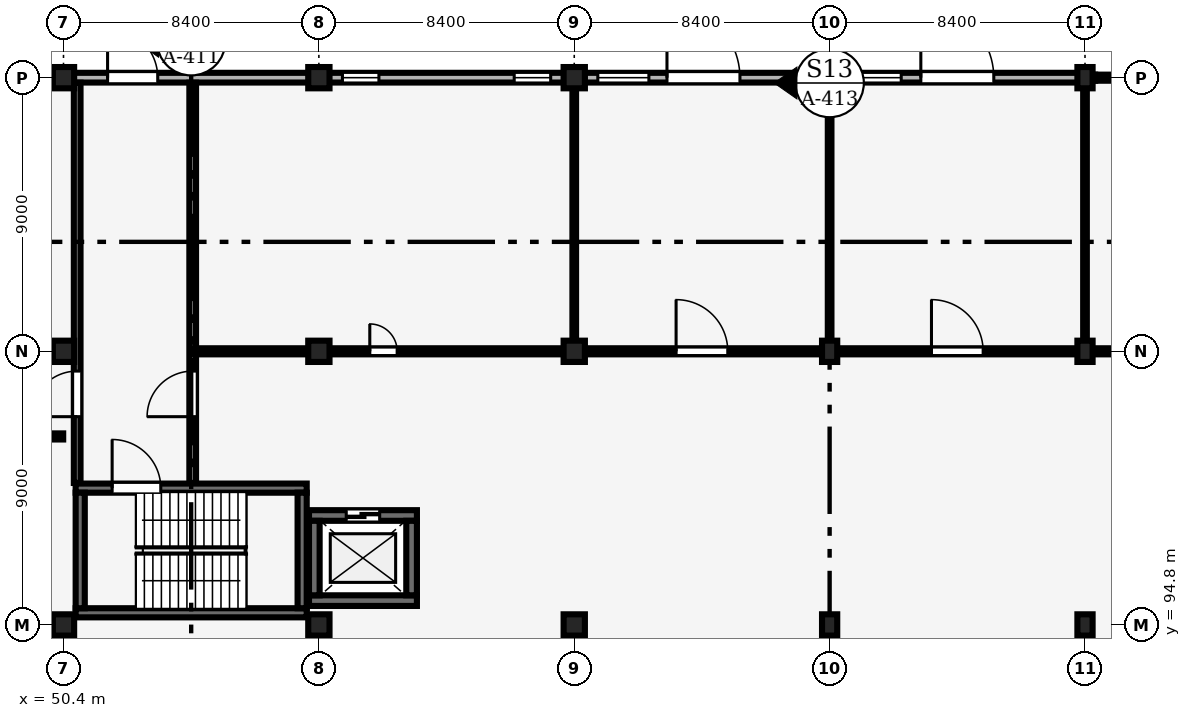
"""IFC4 building model, lengths in metres.
Left out: names, types, materials, properties, quantities, classifications, styles, units other than length and angle.
Written with IfcOpenShell. Run it as: python <this file> out.ifc"""

import sys

from ifc_helpers import new_model, si_unit, direction, frame, frame_2d, origin, origin_2d, place, context, subcontext, project, spatial, rectangle, extrude, element, fill, save


model = new_model("IFC4")
c1 = context("Model", 3, precision=1e-05, world=origin(), true_north=direction((0.0, 1.0)))
c2 = subcontext(c1, "Body", "Model", "MODEL_VIEW")
j1 = project(units=[si_unit("LENGTHUNIT", "METRE"), si_unit("PLANEANGLEUNIT", "RADIAN")], contexts=[c1])
p1 = place(None, origin())
s1 = spatial("IfcSite", under=j1, at=p1, CompositionType="ELEMENT")
p2 = place(p1, origin())
s2 = spatial("IfcBuilding", under=s1, at=p2, CompositionType="ELEMENT")
p3 = place(p2, origin())
s3 = spatial("IfcBuildingStorey", under=s2, at=p3, CompositionType="ELEMENT", Elevation=0.0)
for number, where, z_axis, x_axis in (
    (1, (50.4, 94.8, 0.0), (0.0, 0.0, 1.0), (1.0, 0.0, 0.0)),
    (2, (50.4, 103.8, 0.0), (0.0, 0.0, 1.0), (1.0, 0.0, 0.0)),
    (3, (50.4, 112.8, 0.0), (0.0, 0.0, 1.0), (1.0, 0.0, 0.0)),
    (4, (58.8, 94.8, 0.0), (0.0, 0.0, 1.0), (1.0, 0.0, 0.0)),
    (5, (58.8, 103.8, 0.0), (0.0, 0.0, 1.0), (1.0, 0.0, 0.0)),
    (6, (58.8, 112.8, 0.0), (0.0, 0.0, 1.0), (1.0, 0.0, 0.0)),
    (7, (67.2, 94.8, 0.0), (0.0, 0.0, 1.0), (1.0, 0.0, 0.0)),
    (8, (67.2, 103.8, 0.0), (0.0, 0.0, 1.0), (1.0, 0.0, 0.0)),
    (9, (67.2, 112.8, 0.0), (0.0, 0.0, 1.0), (1.0, 0.0, 0.0)),
):
    element("IfcColumn", number, at=place(p3, frame(where, z_axis=z_axis, x_axis=x_axis)), inside=s3, PredefinedType="COLUMN", context=c2, shape_type="SweptSolid", body=[
        extrude(rectangle(XDim=0.7, YDim=0.7, at=origin_2d()), origin(), (0.0, 0.0, 1.0), 4.8),
    ])
for number, where, z_axis, x_axis in (
    (10, (75.6, 94.8, 0.0), (0.0, 0.0, 1.0), (1.0, 0.0, 0.0)),
    (11, (75.6, 103.8, 0.0), (0.0, 0.0, 1.0), (1.0, 0.0, 0.0)),
    (12, (75.6, 112.8, 0.0), (0.0, 0.0, 1.0), (1.0, 0.0, 0.0)),
    (13, (84.0, 94.8, 0.0), (0.0, 0.0, 1.0), (1.0, 0.0, 0.0)),
    (14, (84.0, 103.8, 0.0), (0.0, 0.0, 1.0), (1.0, 0.0, 0.0)),
    (15, (84.0, 112.8, 0.0), (0.0, 0.0, 1.0), (1.0, 0.0, 0.0)),
):
    element("IfcColumn", number, at=place(p3, frame(where, z_axis=z_axis, x_axis=x_axis)), inside=s3, PredefinedType="COLUMN", context=c2, shape_type="SweptSolid", body=[
        extrude(rectangle(XDim=0.5, YDim=0.7, at=origin_2d()), origin(), (0.0, 0.0, 1.0), 4.8),
    ])
p4 = place(p3, frame((42.325, 112.8, 0.0), z_axis=(0.0, 0.0, 1.0), x_axis=(1.0, 0.0, 0.0)))
e16 = element("IfcWall", 16, at=p4, inside=s3, PredefinedType="SOLIDWALL", context=c2, shape_type="SweptSolid", body=[
    extrude(rectangle(XDim=7.75, YDim=0.32, at=frame_2d((3.875, 0.0))), origin(), (0.0, 0.0, 1.0), 3.92),
])
p5 = place(p4, frame((0.45, 0.0, 0.9)))
e17 = element("IfcOpeningElement", 17, at=p5, cuts=e16, PredefinedType="OPENING", context=c2, shape_type="SweptSolid", body=[
    extrude(rectangle(XDim=1.2, YDim=1.8, at=frame_2d((0.6, 0.9))), frame((0.0, 0.17, 0.0), z_axis=(0.0, -1.0, 0.0), x_axis=(1.0, 0.0, 0.0)), (0.0, 0.0, 1.0), 0.34),
])
p6 = place(p4, frame((5.82, 0.0, 0.9)))
e18 = element("IfcOpeningElement", 18, at=p6, cuts=e16, PredefinedType="OPENING", context=c2, shape_type="SweptSolid", body=[
    extrude(rectangle(XDim=1.68, YDim=2.4, at=frame_2d((0.84, 1.2))), frame((0.0, 0.17, 0.0), z_axis=(0.0, -1.0, 0.0), x_axis=(1.0, 0.0, 0.0)), (0.0, 0.0, 1.0), 0.34),
])
p7 = place(p3, frame((50.725, 112.8, 0.0), z_axis=(0.0, 0.0, 1.0), x_axis=(1.0, 0.0, 0.0)))
e19 = element("IfcWall", 19, at=p7, inside=s3, PredefinedType="SOLIDWALL", context=c2, shape_type="SweptSolid", body=[
    extrude(rectangle(XDim=7.75, YDim=0.32, at=frame_2d((3.875, 0.0))), origin(), (0.0, 0.0, 1.0), 3.87),
])
p8 = place(p7, frame((1.125, 0.0, 0.0)))
e20 = element("IfcOpeningElement", 20, at=p8, cuts=e19, PredefinedType="OPENING", context=c2, shape_type="SweptSolid", body=[
    extrude(rectangle(XDim=1.65, YDim=2.25, at=frame_2d((0.825, 1.125))), frame((0.0, 0.17, 0.0), z_axis=(0.0, -1.0, 0.0), x_axis=(1.0, 0.0, 0.0)), (0.0, 0.0, 1.0), 0.34),
])
p9 = place(p3, frame((59.125, 112.8, 0.0), z_axis=(0.0, 0.0, 1.0), x_axis=(1.0, 0.0, 0.0)))
e21 = element("IfcWall", 21, at=p9, inside=s3, PredefinedType="SOLIDWALL", context=c2, shape_type="SweptSolid", body=[
    extrude(rectangle(XDim=7.75, YDim=0.32, at=frame_2d((3.875, 0.0))), origin(), (0.0, 0.0, 1.0), 3.82),
])
p10 = place(p9, frame((0.45, 0.0, 0.9)))
e22 = element("IfcOpeningElement", 22, at=p10, cuts=e21, PredefinedType="OPENING", context=c2, shape_type="SweptSolid", body=[
    extrude(rectangle(XDim=1.2, YDim=1.5, at=frame_2d((0.6, 0.75))), frame((0.0, 0.17, 0.0), z_axis=(0.0, -1.0, 0.0), x_axis=(1.0, 0.0, 0.0)), (0.0, 0.0, 1.0), 0.34),
])
p11 = place(p9, frame((6.1, 0.0, 0.9)))
e23 = element("IfcOpeningElement", 23, at=p11, cuts=e21, PredefinedType="OPENING", context=c2, shape_type="SweptSolid", body=[
    extrude(rectangle(XDim=1.2, YDim=1.8, at=frame_2d((0.6, 0.9))), frame((0.0, 0.17, 0.0), z_axis=(0.0, -1.0, 0.0), x_axis=(1.0, 0.0, 0.0)), (0.0, 0.0, 1.0), 0.34),
])
p12 = place(p3, frame((67.525, 112.8, 0.0), z_axis=(0.0, 0.0, 1.0), x_axis=(1.0, 0.0, 0.0)))
e24 = element("IfcWall", 24, at=p12, inside=s3, PredefinedType="SOLIDWALL", context=c2, shape_type="SweptSolid", body=[
    extrude(rectangle(XDim=7.85, YDim=0.32, at=frame_2d((3.925, 0.0))), origin(), (0.0, 0.0, 1.0), 3.87),
])
p13 = place(p12, frame((2.725, 0.0, 0.0)))
e25 = element("IfcOpeningElement", 25, at=p13, cuts=e24, PredefinedType="OPENING", context=c2, shape_type="SweptSolid", body=[
    extrude(rectangle(XDim=2.4, YDim=2.6, at=frame_2d((1.2, 1.3))), frame((0.0, 0.17, 0.0), z_axis=(0.0, -1.0, 0.0), x_axis=(1.0, 0.0, 0.0)), (0.0, 0.0, 1.0), 0.34),
])
p14 = place(p12, frame((0.45, 0.0, 0.95)))
e26 = element("IfcOpeningElement", 26, at=p14, cuts=e24, PredefinedType="OPENING", context=c2, shape_type="SweptSolid", body=[
    extrude(rectangle(XDim=1.68, YDim=1.8, at=frame_2d((0.84, 0.9))), frame((0.0, 0.17, 0.0), z_axis=(0.0, -1.0, 0.0), x_axis=(1.0, 0.0, 0.0)), (0.0, 0.0, 1.0), 0.34),
])
p15 = place(p3, frame((75.825, 112.8, 0.0), z_axis=(0.0, 0.0, 1.0), x_axis=(1.0, 0.0, 0.0)))
e27 = element("IfcWall", 27, at=p15, inside=s3, PredefinedType="SOLIDWALL", context=c2, shape_type="SweptSolid", body=[
    extrude(rectangle(XDim=7.95, YDim=0.32, at=frame_2d((3.975, 0.0))), origin(), (0.0, 0.0, 1.0), 3.82),
])
p16 = place(p15, frame((2.775, 0.0, 0.0)))
e28 = element("IfcOpeningElement", 28, at=p16, cuts=e27, PredefinedType="OPENING", context=c2, shape_type="SweptSolid", body=[
    extrude(rectangle(XDim=2.4, YDim=2.6, at=frame_2d((1.2, 1.3))), frame((0.0, 0.17, 0.0), z_axis=(0.0, -1.0, 0.0), x_axis=(1.0, 0.0, 0.0)), (0.0, 0.0, 1.0), 0.34),
])
p17 = place(p15, frame((0.45, 0.0, 0.95)))
e29 = element("IfcOpeningElement", 29, at=p17, cuts=e27, PredefinedType="OPENING", context=c2, shape_type="SweptSolid", body=[
    extrude(rectangle(XDim=1.68, YDim=1.8, at=frame_2d((0.84, 0.9))), frame((0.0, 0.17, 0.0), z_axis=(0.0, -1.0, 0.0), x_axis=(1.0, 0.0, 0.0)), (0.0, 0.0, 1.0), 0.34),
])
p18 = place(p3, frame((50.8, 95.2, 0.0), z_axis=(0.0, 0.0, 1.0), x_axis=(1.0, 0.0, 0.0)))
e30 = element("IfcWall", 30, at=p18, inside=s3, PredefinedType="SHEAR", context=c2, shape_type="SweptSolid", body=[
    extrude(rectangle(XDim=7.6, YDim=0.3, at=frame_2d((3.8, 0.0))), origin(), (0.0, 0.0, 1.0), 4.625),
])
p19 = place(p3, frame((50.8, 99.3, 0.0), z_axis=(0.0, 0.0, 1.0), x_axis=(1.0, 0.0, 0.0)))
e31 = element("IfcWall", 31, at=p19, inside=s3, PredefinedType="SHEAR", context=c2, shape_type="SweptSolid", body=[
    extrude(rectangle(XDim=7.6, YDim=0.3, at=frame_2d((3.8, 0.0))), origin(), (0.0, 0.0, 1.0), 4.625),
])
p20 = place(p19, frame((1.2, 0.0, 0.0)))
e32 = element("IfcOpeningElement", 32, at=p20, cuts=e31, PredefinedType="OPENING", context=c2, shape_type="SweptSolid", body=[
    extrude(rectangle(XDim=1.6, YDim=2.2, at=frame_2d((0.8, 1.1))), frame((0.0, 0.16, 0.0), z_axis=(0.0, -1.0, 0.0), x_axis=(1.0, 0.0, 0.0)), (0.0, 0.0, 1.0), 0.32),
])
for number, where, z_axis, x_axis in (
    (33, (50.95, 95.35, 0.0), (0.0, 0.0, 1.0), (0.0, 1.0, 0.0)),
    (34, (58.25, 95.35, 0.0), (0.0, 0.0, 1.0), (0.0, 1.0, 0.0)),
):
    element("IfcWall", number, at=place(p3, frame(where, z_axis=z_axis, x_axis=x_axis)), inside=s3, PredefinedType="SHEAR", context=c2, shape_type="SweptSolid", body=[
        extrude(rectangle(XDim=3.8, YDim=0.3, at=frame_2d((1.9, 0.0))), origin(), (0.0, 0.0, 1.0), 4.625),
    ])
p21 = place(p3, frame((58.475, 95.6, 0.0), z_axis=(0.0, 0.0, 1.0), x_axis=(1.0, 0.0, 0.0)))
e35 = element("IfcWall", 35, at=p21, inside=s3, PredefinedType="SHEAR", context=c2, shape_type="SweptSolid", body=[
    extrude(rectangle(XDim=3.55, YDim=0.35, at=frame_2d((1.775, 0.0))), origin(), (0.0, 0.0, 1.0), 4.52),
])
p22 = place(p3, frame((58.475, 98.4, 0.0), z_axis=(0.0, 0.0, 1.0), x_axis=(1.0, 0.0, 0.0)))
e36 = element("IfcWall", 36, at=p22, inside=s3, PredefinedType="SHEAR", context=c2, shape_type="SweptSolid", body=[
    extrude(rectangle(XDim=3.55, YDim=0.35, at=frame_2d((1.775, 0.0))), origin(), (0.0, 0.0, 1.0), 4.52),
])
p23 = place(p22, frame((1.225, 0.0, 0.0)))
e37 = element("IfcOpeningElement", 37, at=p23, cuts=e36, PredefinedType="OPENING", context=c2, shape_type="SweptSolid", body=[
    extrude(rectangle(XDim=1.1, YDim=2.2, at=frame_2d((0.55, 1.1))), frame((0.0, 0.185, 0.0), z_axis=(0.0, -1.0, 0.0), x_axis=(1.0, 0.0, 0.0)), (0.0, 0.0, 1.0), 0.37),
])
for number, where, z_axis, x_axis in (
    (38, (58.65, 95.775, 0.0), (0.0, 0.0, 1.0), (0.0, 1.0, 0.0)),
    (39, (61.85, 95.775, 0.0), (0.0, 0.0, 1.0), (0.0, 1.0, 0.0)),
):
    element("IfcWall", number, at=place(p3, frame(where, z_axis=z_axis, x_axis=x_axis)), inside=s3, PredefinedType="SHEAR", context=c2, shape_type="SweptSolid", body=[
        extrude(rectangle(XDim=2.45, YDim=0.35, at=frame_2d((1.225, 0.0))), origin(), (0.0, 0.0, 1.0), 4.52),
    ])
p24 = place(p3, frame((50.85, 99.47, 0.0), z_axis=(0.0, 0.0, 1.0), x_axis=(0.0, 1.0, 0.0)))
e40 = element("IfcWall", 40, at=p24, inside=s3, PredefinedType="SOLIDWALL", context=c2, shape_type="SweptSolid", body=[
    extrude(rectangle(XDim=13.165, YDim=0.22, at=frame_2d((6.583, 0.0))), origin(), (0.0, 0.0, 1.0), 4.5),
])
p25 = place(p24, frame((2.18, 0.0, 0.0)))
e41 = element("IfcOpeningElement", 41, at=p25, cuts=e40, PredefinedType="OPENING", context=c2, shape_type="SweptSolid", body=[
    extrude(rectangle(XDim=1.5, YDim=2.2, at=frame_2d((0.75, 1.1))), frame((0.0, 0.12, 0.0), z_axis=(0.0, -1.0, 0.0), x_axis=(1.0, 0.0, 0.0)), (0.0, 0.0, 1.0), 0.24),
])
p26 = place(p3, frame((54.65, 99.47, 0.0), z_axis=(0.0, 0.0, 1.0), x_axis=(0.0, 1.0, 0.0)))
e42 = element("IfcWall", 42, at=p26, inside=s3, PredefinedType="SOLIDWALL", context=c2, shape_type="SweptSolid", body=[
    extrude(rectangle(XDim=13.165, YDim=0.22, at=frame_2d((6.583, 0.0))), origin(), (0.0, 0.0, 1.0), 4.5),
])
p27 = place(p26, frame((2.18, 0.0, 0.0)))
e43 = element("IfcOpeningElement", 43, at=p27, cuts=e42, PredefinedType="OPENING", context=c2, shape_type="SweptSolid", body=[
    extrude(rectangle(XDim=1.5, YDim=2.2, at=frame_2d((0.75, 1.1))), frame((0.0, 0.12, 0.0), z_axis=(0.0, -1.0, 0.0), x_axis=(1.0, 0.0, 0.0)), (0.0, 0.0, 1.0), 0.24),
])
p28 = place(p3, frame((42.195, 103.8, 0.0), z_axis=(0.0, 0.0, 1.0), x_axis=(1.0, 0.0, 0.0)))
e44 = element("IfcWall", 44, at=p28, inside=s3, PredefinedType="SHEAR", context=c2, shape_type="SweptSolid", body=[
    extrude(rectangle(XDim=7.845, YDim=0.3, at=frame_2d((3.922, 0.0))), origin(), (0.0, 0.0, 1.0), 3.67),
])
p29 = place(p28, frame((3.585, 0.0, 0.0)))
e45 = element("IfcOpeningElement", 45, at=p29, cuts=e44, PredefinedType="OPENING", context=c2, shape_type="SweptSolid", body=[
    extrude(rectangle(XDim=1.05, YDim=2.1, at=frame_2d((0.525, 1.05))), frame((0.0, 0.16, 0.0), z_axis=(0.0, -1.0, 0.0), x_axis=(1.0, 0.0, 0.0)), (0.0, 0.0, 1.0), 0.32),
])
p30 = place(p3, frame((67.2, 103.905, 0.0), z_axis=(0.0, 0.0, 1.0), x_axis=(0.0, 1.0, 0.0)))
e46 = element("IfcWall", 46, at=p30, inside=s3, PredefinedType="PARTITIONING", context=c2, shape_type="SweptSolid", body=[
    extrude(rectangle(XDim=8.73, YDim=0.12, at=frame_2d((4.365, 0.0))), origin(), (0.0, 0.0, 1.0), 3.52),
])
p31 = place(p3, frame((75.6, 103.905, 0.0), z_axis=(0.0, 0.0, 1.0), x_axis=(0.0, 1.0, 0.0)))
e47 = element("IfcWall", 47, at=p31, inside=s3, PredefinedType="PARTITIONING", context=c2, shape_type="SweptSolid", body=[
    extrude(rectangle(XDim=8.73, YDim=0.12, at=frame_2d((4.365, 0.0))), origin(), (0.0, 0.0, 1.0), 3.87),
])
p32 = place(p3, frame((84.0, 103.905, 0.0), z_axis=(0.0, 0.0, 1.0), x_axis=(0.0, 1.0, 0.0)))
e48 = element("IfcWall", 48, at=p32, inside=s3, PredefinedType="PARTITIONING", context=c2, shape_type="SweptSolid", body=[
    extrude(rectangle(XDim=8.73, YDim=0.12, at=frame_2d((4.365, 0.0))), origin(), (0.0, 0.0, 1.0), 3.72),
])
p33 = place(p3, frame((54.66, 103.8, 0.0), z_axis=(0.0, 0.0, 1.0), x_axis=(1.0, 0.0, 0.0)))
e49 = element("IfcWall", 49, at=p33, inside=s3, PredefinedType="PARTITIONING", context=c2, shape_type="SweptSolid", body=[
    extrude(rectangle(XDim=3.78, YDim=0.2, at=frame_2d((1.89, 0.0))), origin(), (0.0, 0.0, 1.0), 3.67),
])
p34 = place(p3, frame((59.16, 103.8, 0.0), z_axis=(0.0, 0.0, 1.0), x_axis=(1.0, 0.0, 0.0)))
e50 = element("IfcWall", 50, at=p34, inside=s3, PredefinedType="PARTITIONING", context=c2, shape_type="SweptSolid", body=[
    extrude(rectangle(XDim=7.68, YDim=0.2, at=frame_2d((3.84, 0.0))), origin(), (0.0, 0.0, 1.0), 3.62),
])
p35 = place(p34, frame((1.315, 0.0, 0.0)))
e51 = element("IfcOpeningElement", 51, at=p35, cuts=e50, PredefinedType="OPENING", context=c2, shape_type="SweptSolid", body=[
    extrude(rectangle(XDim=0.9, YDim=2.1, at=frame_2d((0.45, 1.05))), frame((0.0, 0.11, 0.0), z_axis=(0.0, -1.0, 0.0), x_axis=(1.0, 0.0, 0.0)), (0.0, 0.0, 1.0), 0.22),
])
p36 = place(p3, frame((67.56, 103.8, 0.0), z_axis=(0.0, 0.0, 1.0), x_axis=(1.0, 0.0, 0.0)))
e52 = element("IfcWall", 52, at=p36, inside=s3, PredefinedType="PARTITIONING", context=c2, shape_type="SweptSolid", body=[
    extrude(rectangle(XDim=7.78, YDim=0.2, at=frame_2d((3.89, 0.0))), origin(), (0.0, 0.0, 1.0), 3.57),
])
p37 = place(p36, frame((2.99, 0.0, 0.0)))
e53 = element("IfcOpeningElement", 53, at=p37, cuts=e52, PredefinedType="OPENING", context=c2, shape_type="SweptSolid", body=[
    extrude(rectangle(XDim=1.7, YDim=2.25, at=frame_2d((0.85, 1.125))), frame((0.0, 0.11, 0.0), z_axis=(0.0, -1.0, 0.0), x_axis=(1.0, 0.0, 0.0)), (0.0, 0.0, 1.0), 0.22),
])
p38 = place(p3, frame((75.86, 103.8, 0.0), z_axis=(0.0, 0.0, 1.0), x_axis=(1.0, 0.0, 0.0)))
e54 = element("IfcWall", 54, at=p38, inside=s3, PredefinedType="PARTITIONING", context=c2, shape_type="SweptSolid", body=[
    extrude(rectangle(XDim=7.88, YDim=0.2, at=frame_2d((3.94, 0.0))), origin(), (0.0, 0.0, 1.0), 3.57),
])
p39 = place(p38, frame((3.09, 0.0, 0.0)))
e55 = element("IfcOpeningElement", 55, at=p39, cuts=e54, PredefinedType="OPENING", context=c2, shape_type="SweptSolid", body=[
    extrude(rectangle(XDim=1.7, YDim=2.25, at=frame_2d((0.85, 1.125))), frame((0.0, 0.11, 0.0), z_axis=(0.0, -1.0, 0.0), x_axis=(1.0, 0.0, 0.0)), (0.0, 0.0, 1.0), 0.22),
])
p40 = place(p3, frame((84.26, 103.8, 0.0), z_axis=(0.0, 0.0, 1.0), x_axis=(1.0, 0.0, 0.0)))
e56 = element("IfcWall", 56, at=p40, inside=s3, PredefinedType="PARTITIONING", context=c2, shape_type="SweptSolid", body=[
    extrude(rectangle(XDim=7.78, YDim=0.2, at=frame_2d((3.89, 0.0))), origin(), (0.0, 0.0, 1.0), 3.52),
])
p41 = place(p40, frame((5.29, 0.0, 0.0)))
e57 = element("IfcOpeningElement", 57, at=p41, cuts=e56, PredefinedType="OPENING", context=c2, shape_type="SweptSolid", body=[
    extrude(rectangle(XDim=0.9, YDim=2.1, at=frame_2d((0.45, 1.05))), frame((0.0, 0.11, 0.0), z_axis=(0.0, -1.0, 0.0), x_axis=(1.0, 0.0, 0.0)), (0.0, 0.0, 1.0), 0.22),
])
p42 = place(p3, frame((42.195, 101.0, 0.0), z_axis=(0.0, 0.0, 1.0), x_axis=(1.0, 0.0, 0.0)))
e58 = element("IfcWall", 58, at=p42, inside=s3, PredefinedType="PARTITIONING", context=c2, shape_type="SweptSolid", body=[
    extrude(rectangle(XDim=8.195, YDim=0.2, at=frame_2d((4.097, 0.0))), origin(), (0.0, 0.0, 1.0), 4.07),
])
p43 = place(p42, frame((3.505, 0.0, 0.0)))
e59 = element("IfcOpeningElement", 59, at=p43, cuts=e58, PredefinedType="OPENING", context=c2, shape_type="SweptSolid", body=[
    extrude(rectangle(XDim=1.0, YDim=2.25, at=frame_2d((0.5, 1.125))), frame((0.0, 0.11, 0.0), z_axis=(0.0, -1.0, 0.0), x_axis=(1.0, 0.0, 0.0)), (0.0, 0.0, 1.0), 0.22),
])
p44 = place(p8, origin())
e60 = element("IfcDoor", 60, at=p44, inside=s3, OperationType="DOUBLE_DOOR_SINGLE_SWING", PredefinedType="DOOR", context=c2, shape_type="SweptSolid", body=[
    extrude(rectangle(XDim=1.65, YDim=2.25, at=frame_2d((0.825, 1.125))), frame((0.0, 0.025, 0.0), z_axis=(0.0, -1.0, 0.0), x_axis=(1.0, 0.0, 0.0)), (0.0, 0.0, 1.0), 0.05),
])
fill(e20, e60)
p45 = place(p10, origin())
e61 = element("IfcWindow", 61, at=p45, inside=s3, PartitioningType="SINGLE_PANEL", PredefinedType="WINDOW", context=c2, shape_type="SweptSolid", body=[
    extrude(rectangle(XDim=1.2, YDim=1.5, at=frame_2d((0.6, 0.75))), frame((0.0, 0.03, 0.0), z_axis=(0.0, -1.0, 0.0), x_axis=(1.0, 0.0, 0.0)), (0.0, 0.0, 1.0), 0.06),
])
fill(e22, e61)
p46 = place(p11, origin())
e62 = element("IfcWindow", 62, at=p46, inside=s3, PartitioningType="SINGLE_PANEL", PredefinedType="WINDOW", context=c2, shape_type="SweptSolid", body=[
    extrude(rectangle(XDim=1.2, YDim=1.8, at=frame_2d((0.6, 0.9))), frame((0.0, 0.03, 0.0), z_axis=(0.0, -1.0, 0.0), x_axis=(1.0, 0.0, 0.0)), (0.0, 0.0, 1.0), 0.06),
])
fill(e23, e62)
p47 = place(p13, origin())
e63 = element("IfcDoor", 63, at=p47, inside=s3, OperationType="DOUBLE_DOOR_SINGLE_SWING", PredefinedType="DOOR", context=c2, shape_type="SweptSolid", body=[
    extrude(rectangle(XDim=2.4, YDim=2.6, at=frame_2d((1.2, 1.3))), frame((0.0, 0.025, 0.0), z_axis=(0.0, -1.0, 0.0), x_axis=(1.0, 0.0, 0.0)), (0.0, 0.0, 1.0), 0.05),
])
fill(e25, e63)
p48 = place(p14, origin())
e64 = element("IfcWindow", 64, at=p48, inside=s3, PartitioningType="SINGLE_PANEL", PredefinedType="WINDOW", context=c2, shape_type="SweptSolid", body=[
    extrude(rectangle(XDim=1.68, YDim=1.8, at=frame_2d((0.84, 0.9))), frame((0.0, 0.03, 0.0), z_axis=(0.0, -1.0, 0.0), x_axis=(1.0, 0.0, 0.0)), (0.0, 0.0, 1.0), 0.06),
])
fill(e26, e64)
p49 = place(p16, origin())
e65 = element("IfcDoor", 65, at=p49, inside=s3, OperationType="DOUBLE_DOOR_SINGLE_SWING", PredefinedType="DOOR", context=c2, shape_type="SweptSolid", body=[
    extrude(rectangle(XDim=2.4, YDim=2.6, at=frame_2d((1.2, 1.3))), frame((0.0, 0.025, 0.0), z_axis=(0.0, -1.0, 0.0), x_axis=(1.0, 0.0, 0.0)), (0.0, 0.0, 1.0), 0.05),
])
fill(e28, e65)
p50 = place(p17, origin())
e66 = element("IfcWindow", 66, at=p50, inside=s3, PartitioningType="SINGLE_PANEL", PredefinedType="WINDOW", context=c2, shape_type="SweptSolid", body=[
    extrude(rectangle(XDim=1.68, YDim=1.8, at=frame_2d((0.84, 0.9))), frame((0.0, 0.03, 0.0), z_axis=(0.0, -1.0, 0.0), x_axis=(1.0, 0.0, 0.0)), (0.0, 0.0, 1.0), 0.06),
])
fill(e29, e66)
p51 = place(p20, origin())
e67 = element("IfcDoor", 67, at=p51, inside=s3, OperationType="DOUBLE_DOOR_SINGLE_SWING", PredefinedType="DOOR", context=c2, shape_type="SweptSolid", body=[
    extrude(rectangle(XDim=1.6, YDim=2.2, at=frame_2d((0.8, 1.1))), frame((0.0, 0.025, 0.0), z_axis=(0.0, -1.0, 0.0), x_axis=(1.0, 0.0, 0.0)), (0.0, 0.0, 1.0), 0.05),
])
fill(e32, e67)
p52 = place(p23, origin())
e68 = element("IfcDoor", 68, at=p52, inside=s3, OperationType="DOUBLE_DOOR_SLIDING", PredefinedType="DOOR", context=c2, shape_type="SweptSolid", body=[
    extrude(rectangle(XDim=1.1, YDim=2.2, at=frame_2d((0.55, 1.1))), frame((0.0, 0.025, 0.0), z_axis=(0.0, -1.0, 0.0), x_axis=(1.0, 0.0, 0.0)), (0.0, 0.0, 1.0), 0.05),
])
fill(e37, e68)
p53 = place(p25, origin())
e69 = element("IfcDoor", 69, at=p53, inside=s3, OperationType="DOUBLE_DOOR_SINGLE_SWING", PredefinedType="DOOR", context=c2, shape_type="SweptSolid", body=[
    extrude(rectangle(XDim=1.5, YDim=2.2, at=frame_2d((0.75, 1.1))), frame((0.0, 0.025, 0.0), z_axis=(0.0, -1.0, 0.0), x_axis=(1.0, 0.0, 0.0)), (0.0, 0.0, 1.0), 0.05),
])
fill(e41, e69)
p54 = place(p27, origin())
e70 = element("IfcDoor", 70, at=p54, inside=s3, OperationType="DOUBLE_DOOR_SINGLE_SWING", PredefinedType="DOOR", context=c2, shape_type="SweptSolid", body=[
    extrude(rectangle(XDim=1.5, YDim=2.2, at=frame_2d((0.75, 1.1))), frame((0.0, 0.025, 0.0), z_axis=(0.0, -1.0, 0.0), x_axis=(1.0, 0.0, 0.0)), (0.0, 0.0, 1.0), 0.05),
])
fill(e43, e70)
p55 = place(p35, origin())
e71 = element("IfcDoor", 71, at=p55, inside=s3, OperationType="SINGLE_SWING_LEFT", PredefinedType="DOOR", context=c2, shape_type="SweptSolid", body=[
    extrude(rectangle(XDim=0.9, YDim=2.1, at=frame_2d((0.45, 1.05))), frame((0.0, 0.025, 0.0), z_axis=(0.0, -1.0, 0.0), x_axis=(1.0, 0.0, 0.0)), (0.0, 0.0, 1.0), 0.05),
])
fill(e51, e71)
p56 = place(p37, origin())
e72 = element("IfcDoor", 72, at=p56, inside=s3, OperationType="DOUBLE_DOOR_SINGLE_SWING", PredefinedType="DOOR", context=c2, shape_type="SweptSolid", body=[
    extrude(rectangle(XDim=1.7, YDim=2.25, at=frame_2d((0.85, 1.125))), frame((0.0, 0.025, 0.0), z_axis=(0.0, -1.0, 0.0), x_axis=(1.0, 0.0, 0.0)), (0.0, 0.0, 1.0), 0.05),
])
fill(e53, e72)
p57 = place(p39, origin())
e73 = element("IfcDoor", 73, at=p57, inside=s3, OperationType="DOUBLE_DOOR_SINGLE_SWING", PredefinedType="DOOR", context=c2, shape_type="SweptSolid", body=[
    extrude(rectangle(XDim=1.7, YDim=2.25, at=frame_2d((0.85, 1.125))), frame((0.0, 0.025, 0.0), z_axis=(0.0, -1.0, 0.0), x_axis=(1.0, 0.0, 0.0)), (0.0, 0.0, 1.0), 0.05),
])
fill(e55, e73)
save(model, sys.argv[1])
